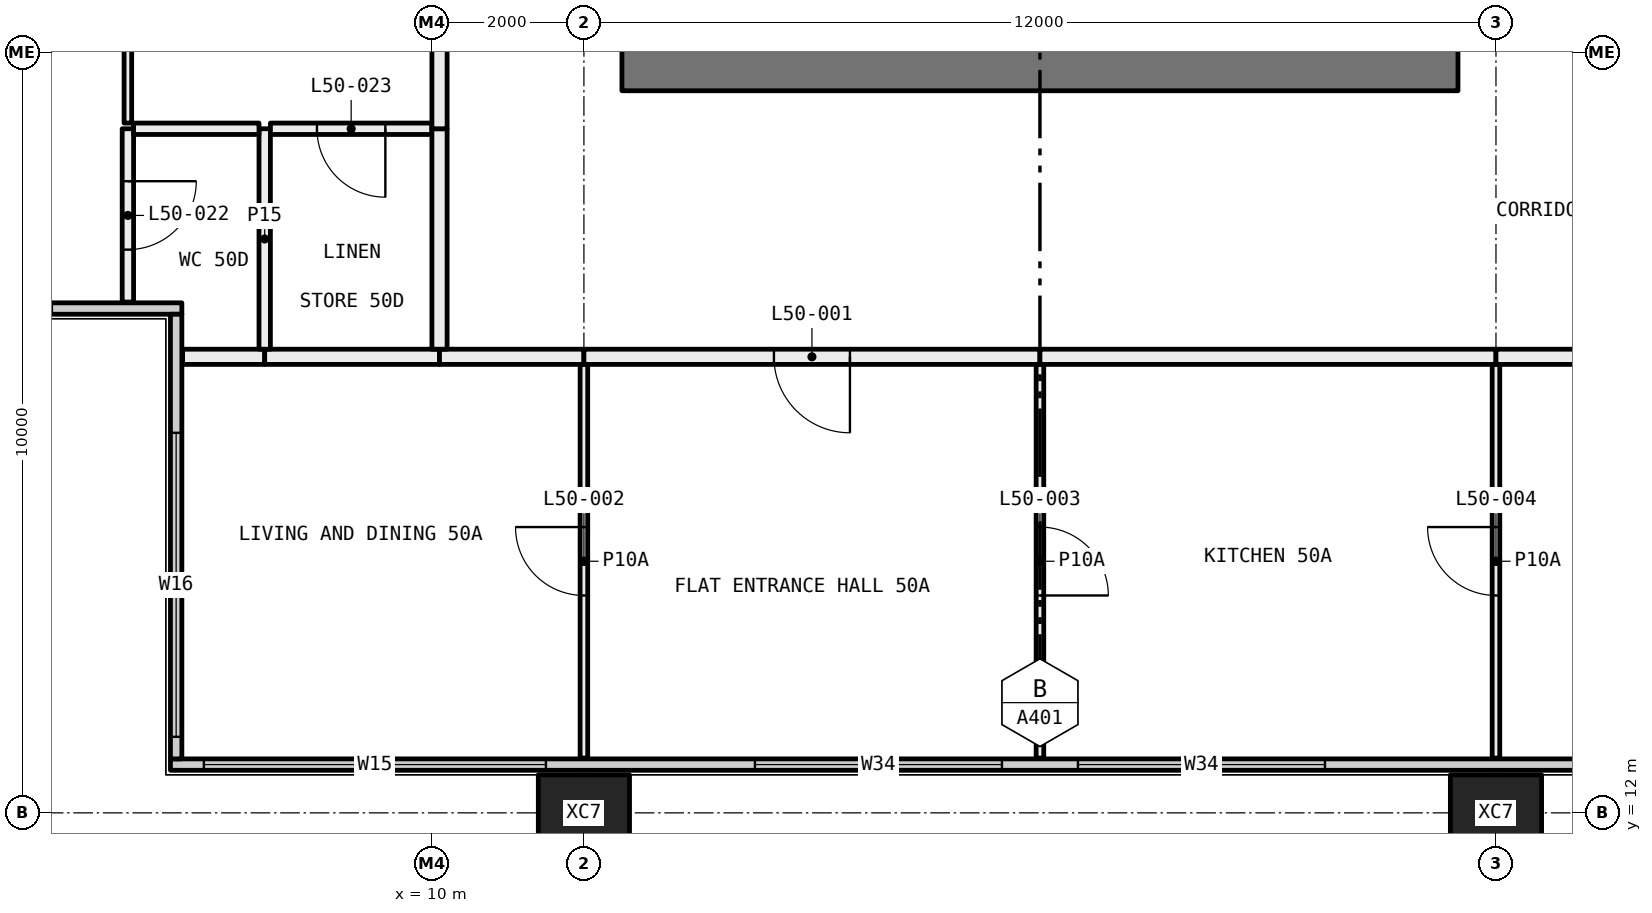
"""IFC4 building model, lengths in metres.
Left out: names, types, materials, properties, quantities, classifications, styles, units other than length and angle.
Written with IfcOpenShell. Run it as: python <this file> out.ifc"""

import sys

from ifc_helpers import new_model, si_unit, direction, frame, frame_2d, origin, origin_2d, place, context, subcontext, project, spatial, rectangle, hollow_rectangle, extrude, element, fill, save


model = new_model("IFC4")
c1 = context("Model", 3, precision=1e-05, world=origin(), true_north=direction((0.0, 1.0)))
c2 = subcontext(c1, "Body", "Model", "MODEL_VIEW")
j1 = project(units=[si_unit("LENGTHUNIT", "METRE"), si_unit("PLANEANGLEUNIT", "RADIAN")], contexts=[c1])
p1 = place(None, origin())
s1 = spatial("IfcSite", under=j1, at=p1, CompositionType="ELEMENT")
p2 = place(p1, origin())
s2 = spatial("IfcBuilding", under=s1, at=p2, CompositionType="ELEMENT")
p3 = place(p2, frame((0.0, 0.0, 189.3)))
s3 = spatial("IfcBuildingStorey", under=s2, at=p3, CompositionType="ELEMENT", Elevation=189.3)
for number, where, z_axis, x_axis in (
    (1, (12.0, 12.0, -0.4), (0.0, 0.0, 1.0), (1.0, 0.0, 0.0)),
    (2, (24.0, 12.0, -0.4), (0.0, 0.0, 1.0), (1.0, 0.0, 0.0)),
):
    element("IfcColumn", number, at=place(p3, frame(where, z_axis=z_axis, x_axis=x_axis)), inside=s3, PredefinedType="COLUMN", context=c2, shape_type="SweptSolid", body=[
        extrude(hollow_rectangle(XDim=1.2, YDim=1.0, WallThickness=0.045, at=origin_2d()), origin(), (0.0, 0.0, 1.0), 3.45),
    ])
p4 = place(p3, frame((6.56, 12.635, 0.0), z_axis=(0.0, 0.0, 1.0), x_axis=(1.0, 0.0, 0.0)))
e3 = element("IfcWall", 3, at=p4, inside=s3, PredefinedType="ELEMENTEDWALL", context=c2, shape_type="SweptSolid", body=[
    extrude(rectangle(XDim=46.88, YDim=0.15, at=frame_2d((23.44, 0.0))), origin(), (0.0, 0.0, 1.0), 3.05),
])
p5 = place(p4, frame((0.44, 0.0, 0.45)))
e4 = element("IfcOpeningElement", 4, at=p5, cuts=e3, PredefinedType="OPENING", context=c2, shape_type="SweptSolid", body=[
    extrude(rectangle(XDim=4.5, YDim=2.55, at=frame_2d((2.25, 1.275))), frame((0.0, 0.085, 0.0), z_axis=(0.0, -1.0, 0.0), x_axis=(1.0, 0.0, 0.0)), (0.0, 0.0, 1.0), 0.17),
])
p6 = place(p4, frame((7.69, 0.0, 0.45)))
e5 = element("IfcOpeningElement", 5, at=p6, cuts=e3, PredefinedType="OPENING", context=c2, shape_type="SweptSolid", body=[
    extrude(rectangle(XDim=3.25, YDim=2.55, at=frame_2d((1.625, 1.275))), frame((0.0, 0.085, 0.0), z_axis=(0.0, -1.0, 0.0), x_axis=(1.0, 0.0, 0.0)), (0.0, 0.0, 1.0), 0.17),
])
p7 = place(p4, frame((11.94, 0.0, 0.45)))
e6 = element("IfcOpeningElement", 6, at=p7, cuts=e3, PredefinedType="OPENING", context=c2, shape_type="SweptSolid", body=[
    extrude(rectangle(XDim=3.25, YDim=2.55, at=frame_2d((1.625, 1.275))), frame((0.0, 0.085, 0.0), z_axis=(0.0, -1.0, 0.0), x_axis=(1.0, 0.0, 0.0)), (0.0, 0.0, 1.0), 0.17),
])
p8 = place(p4, frame((19.69, 0.0, 0.45)))
e7 = element("IfcOpeningElement", 7, at=p8, cuts=e3, PredefinedType="OPENING", context=c2, shape_type="SweptSolid", body=[
    extrude(rectangle(XDim=3.25, YDim=2.55, at=frame_2d((1.625, 1.275))), frame((0.0, 0.085, 0.0), z_axis=(0.0, -1.0, 0.0), x_axis=(1.0, 0.0, 0.0)), (0.0, 0.0, 1.0), 0.17),
])
p9 = place(p4, frame((23.94, 0.0, 0.45)))
e8 = element("IfcOpeningElement", 8, at=p9, cuts=e3, PredefinedType="OPENING", context=c2, shape_type="SweptSolid", body=[
    extrude(rectangle(XDim=2.0, YDim=2.55, at=frame_2d((1.0, 1.275))), frame((0.0, 0.085, 0.0), z_axis=(0.0, -1.0, 0.0), x_axis=(1.0, 0.0, 0.0)), (0.0, 0.0, 1.0), 0.17),
])
p10 = place(p4, frame((31.69, 0.0, 0.45)))
e9 = element("IfcOpeningElement", 9, at=p10, cuts=e3, PredefinedType="OPENING", context=c2, shape_type="SweptSolid", body=[
    extrude(rectangle(XDim=3.25, YDim=2.55, at=frame_2d((1.625, 1.275))), frame((0.0, 0.085, 0.0), z_axis=(0.0, -1.0, 0.0), x_axis=(1.0, 0.0, 0.0)), (0.0, 0.0, 1.0), 0.17),
])
p11 = place(p4, frame((35.94, 0.0, 0.45)))
e10 = element("IfcOpeningElement", 10, at=p11, cuts=e3, PredefinedType="OPENING", context=c2, shape_type="SweptSolid", body=[
    extrude(rectangle(XDim=3.25, YDim=2.55, at=frame_2d((1.625, 1.275))), frame((0.0, 0.085, 0.0), z_axis=(0.0, -1.0, 0.0), x_axis=(1.0, 0.0, 0.0)), (0.0, 0.0, 1.0), 0.17),
])
p12 = place(p4, frame((41.94, 0.0, 0.45)))
e11 = element("IfcOpeningElement", 11, at=p12, cuts=e3, PredefinedType="OPENING", context=c2, shape_type="SweptSolid", body=[
    extrude(rectangle(XDim=4.5, YDim=2.55, at=frame_2d((2.25, 1.275))), frame((0.0, 0.085, 0.0), z_axis=(0.0, -1.0, 0.0), x_axis=(1.0, 0.0, 0.0)), (0.0, 0.0, 1.0), 0.17),
])
p13 = place(p3, frame((0.56, 18.635, 0.0), z_axis=(0.0, 0.0, 1.0), x_axis=(1.0, 0.0, 0.0)))
e12 = element("IfcWall", 12, at=p13, inside=s3, PredefinedType="ELEMENTEDWALL", context=c2, shape_type="SweptSolid", body=[
    extrude(rectangle(XDim=6.15, YDim=0.15, at=frame_2d((3.075, 0.0))), origin(), (0.0, 0.0, 1.0), 3.05),
])
p14 = place(p13, frame((0.44, 0.0, 0.45)))
e13 = element("IfcOpeningElement", 13, at=p14, cuts=e12, PredefinedType="OPENING", context=c2, shape_type="SweptSolid", body=[
    extrude(rectangle(XDim=4.0, YDim=2.55, at=frame_2d((2.0, 1.275))), frame((0.0, 0.085, 0.0), z_axis=(0.0, -1.0, 0.0), x_axis=(1.0, 0.0, 0.0)), (0.0, 0.0, 1.0), 0.17),
])
p15 = place(p3, frame((6.635, 12.71, 0.0), z_axis=(0.0, 0.0, 1.0), x_axis=(0.0, 1.0, 0.0)))
e14 = element("IfcWall", 14, at=p15, inside=s3, PredefinedType="ELEMENTEDWALL", context=c2, shape_type="SweptSolid", body=[
    extrude(rectangle(XDim=5.85, YDim=0.15, at=frame_2d((2.925, 0.0))), origin(), (0.0, 0.0, 1.0), 3.05),
])
p16 = place(p15, frame((0.29, 0.0, 0.45)))
e15 = element("IfcOpeningElement", 15, at=p16, cuts=e14, PredefinedType="OPENING", context=c2, shape_type="SweptSolid", body=[
    extrude(rectangle(XDim=4.0, YDim=2.55, at=frame_2d((2.0, 1.275))), frame((0.0, 0.085, 0.0), z_axis=(0.0, -1.0, 0.0), x_axis=(1.0, 0.0, 0.0)), (0.0, 0.0, 1.0), 0.17),
])
p17 = place(p3, frame((12.0, 12.72, 0.0), z_axis=(0.0, 0.0, 1.0), x_axis=(0.0, 1.0, 0.0)))
e16 = element("IfcWall", 16, at=p17, inside=s3, PredefinedType="PARTITIONING", context=c2, shape_type="SweptSolid", body=[
    extrude(rectangle(XDim=5.18, YDim=0.1, at=frame_2d((2.59, 0.0))), origin(), (0.0, 0.0, 1.0), 3.05),
])
p18 = place(p17, frame((2.14, 0.0, 0.0)))
e17 = element("IfcOpeningElement", 17, at=p18, cuts=e16, PredefinedType="OPENING", context=c2, shape_type="SweptSolid", body=[
    extrude(rectangle(XDim=0.9, YDim=2.1, at=frame_2d((0.45, 1.05))), frame((0.0, 0.06, 0.0), z_axis=(0.0, -1.0, 0.0), x_axis=(1.0, 0.0, 0.0)), (0.0, 0.0, 1.0), 0.12),
])
p19 = place(p3, frame((7.8, 18.0, 0.0), z_axis=(0.0, 0.0, 1.0), x_axis=(-1.0, 0.0, 0.0)))
e18 = element("IfcWall", 18, at=p19, inside=s3, PredefinedType="PARTITIONING", context=c2, shape_type="SweptSolid", body=[
    extrude(rectangle(XDim=1.08, YDim=0.2, at=frame_2d((0.54, 0.0))), origin(), (0.0, 0.0, 1.0), 3.05),
])
p20 = place(p3, frame((10.1, 18.0, 0.0), z_axis=(0.0, 0.0, 1.0), x_axis=(-1.0, 0.0, 0.0)))
e19 = element("IfcWall", 19, at=p20, inside=s3, PredefinedType="PARTITIONING", context=c2, shape_type="SweptSolid", body=[
    extrude(rectangle(XDim=2.3, YDim=0.2, at=frame_2d((1.15, 0.0))), origin(), (0.0, 0.0, 1.0), 3.05),
])
p21 = place(p3, frame((12.0, 18.0, 0.0), z_axis=(0.0, 0.0, 1.0), x_axis=(-1.0, 0.0, 0.0)))
e20 = element("IfcWall", 20, at=p21, inside=s3, PredefinedType="PARTITIONING", context=c2, shape_type="SweptSolid", body=[
    extrude(rectangle(XDim=1.9, YDim=0.2, at=frame_2d((0.95, 0.0))), origin(), (0.0, 0.0, 1.0), 3.05),
])
p22 = place(p3, frame((18.0, 12.72, 0.0), z_axis=(0.0, 0.0, 1.0), x_axis=(0.0, 1.0, 0.0)))
e21 = element("IfcWall", 21, at=p22, inside=s3, PredefinedType="PARTITIONING", context=c2, shape_type="SweptSolid", body=[
    extrude(rectangle(XDim=5.18, YDim=0.1, at=frame_2d((2.59, 0.0))), origin(), (0.0, 0.0, 1.0), 3.05),
])
p23 = place(p22, frame((2.14, 0.0, 0.0)))
e22 = element("IfcOpeningElement", 22, at=p23, cuts=e21, PredefinedType="OPENING", context=c2, shape_type="SweptSolid", body=[
    extrude(rectangle(XDim=0.9, YDim=2.1, at=frame_2d((0.45, 1.05))), frame((0.0, 0.06, 0.0), z_axis=(0.0, -1.0, 0.0), x_axis=(1.0, 0.0, 0.0)), (0.0, 0.0, 1.0), 0.12),
])
p24 = place(p3, frame((18.0, 18.0, 0.0), z_axis=(0.0, 0.0, 1.0), x_axis=(-1.0, 0.0, 0.0)))
e23 = element("IfcWall", 23, at=p24, inside=s3, PredefinedType="PARTITIONING", context=c2, shape_type="SweptSolid", body=[
    extrude(rectangle(XDim=6.0, YDim=0.2, at=frame_2d((3.0, 0.0))), origin(), (0.0, 0.0, 1.0), 3.05),
])
p25 = place(p24, frame((2.5, 0.0, 0.0)))
e24 = element("IfcOpeningElement", 24, at=p25, cuts=e23, PredefinedType="OPENING", context=c2, shape_type="SweptSolid", body=[
    extrude(rectangle(XDim=1.0, YDim=2.1, at=frame_2d((0.5, 1.05))), frame((0.0, 0.11, 0.0), z_axis=(0.0, -1.0, 0.0), x_axis=(1.0, 0.0, 0.0)), (0.0, 0.0, 1.0), 0.22),
])
p26 = place(p3, frame((24.0, 12.72, 0.0), z_axis=(0.0, 0.0, 1.0), x_axis=(0.0, 1.0, 0.0)))
e25 = element("IfcWall", 25, at=p26, inside=s3, PredefinedType="PARTITIONING", context=c2, shape_type="SweptSolid", body=[
    extrude(rectangle(XDim=5.18, YDim=0.1, at=frame_2d((2.59, 0.0))), origin(), (0.0, 0.0, 1.0), 3.05),
])
p27 = place(p26, frame((2.14, 0.0, 0.0)))
e26 = element("IfcOpeningElement", 26, at=p27, cuts=e25, PredefinedType="OPENING", context=c2, shape_type="SweptSolid", body=[
    extrude(rectangle(XDim=0.9, YDim=2.1, at=frame_2d((0.45, 1.05))), frame((0.0, 0.06, 0.0), z_axis=(0.0, -1.0, 0.0), x_axis=(1.0, 0.0, 0.0)), (0.0, 0.0, 1.0), 0.12),
])
for number, where, z_axis, x_axis in (
    (27, (24.0, 18.0, 0.0), (0.0, 0.0, 1.0), (-1.0, 0.0, 0.0)),
    (28, (30.0, 18.0, 0.0), (0.0, 0.0, 1.0), (-1.0, 0.0, 0.0)),
):
    element("IfcWall", number, at=place(p3, frame(where, z_axis=z_axis, x_axis=x_axis)), inside=s3, PredefinedType="PARTITIONING", context=c2, shape_type="SweptSolid", body=[
        extrude(rectangle(XDim=6.0, YDim=0.2, at=frame_2d((3.0, 0.0))), origin(), (0.0, 0.0, 1.0), 3.05),
    ])
p28 = place(p3, frame((6.0, 18.72, 0.0), z_axis=(0.0, 0.0, 1.0), x_axis=(0.0, 1.0, 0.0)))
e29 = element("IfcWall", 29, at=p28, inside=s3, PredefinedType="PARTITIONING", context=c2, shape_type="SweptSolid", body=[
    extrude(rectangle(XDim=2.28, YDim=0.15, at=frame_2d((1.14, 0.0))), origin(), (0.0, 0.0, 1.0), 3.05),
])
p29 = place(p28, frame((0.69, 0.0, 0.0)))
e30 = element("IfcOpeningElement", 30, at=p29, cuts=e29, PredefinedType="OPENING", context=c2, shape_type="SweptSolid", body=[
    extrude(rectangle(XDim=0.9, YDim=2.1, at=frame_2d((0.45, 1.05))), frame((0.0, 0.085, 0.0), z_axis=(0.0, -1.0, 0.0), x_axis=(1.0, 0.0, 0.0)), (0.0, 0.0, 1.0), 0.17),
])
p30 = place(p3, frame((6.0, 21.075, 0.0), z_axis=(0.0, 0.0, 1.0), x_axis=(0.0, 1.0, 0.0)))
e31 = element("IfcWall", 31, at=p30, inside=s3, PredefinedType="PARTITIONING", context=c2, shape_type="SweptSolid", body=[
    extrude(rectangle(XDim=2.875, YDim=0.1, at=frame_2d((1.438, 0.0))), origin(), (0.0, 0.0, 1.0), 2.45),
])
p31 = place(p3, frame((7.8, 18.1, 0.0), z_axis=(0.0, 0.0, 1.0), x_axis=(0.0, 1.0, 0.0)))
e32 = element("IfcWall", 32, at=p31, inside=s3, PredefinedType="PARTITIONING", context=c2, shape_type="SweptSolid", body=[
    extrude(rectangle(XDim=2.9, YDim=0.15, at=frame_2d((1.45, 0.0))), origin(), (0.0, 0.0, 1.0), 3.05),
])
p32 = place(p3, frame((7.725, 21.0, 0.0), z_axis=(0.0, 0.0, 1.0), x_axis=(-1.0, 0.0, 0.0)))
e33 = element("IfcWall", 33, at=p32, inside=s3, PredefinedType="PARTITIONING", context=c2, shape_type="SweptSolid", body=[
    extrude(rectangle(XDim=1.65, YDim=0.15, at=frame_2d((0.825, 0.0))), origin(), (0.0, 0.0, 1.0), 3.05),
])
p33 = place(p3, frame((10.0, 21.0, 0.0), z_axis=(0.0, 0.0, 1.0), x_axis=(-1.0, 0.0, 0.0)))
e34 = element("IfcWall", 34, at=p33, inside=s3, PredefinedType="PARTITIONING", context=c2, shape_type="SweptSolid", body=[
    extrude(rectangle(XDim=2.125, YDim=0.15, at=frame_2d((1.062, 0.0))), origin(), (0.0, 0.0, 1.0), 3.05),
])
p34 = place(p33, frame((0.613, 0.0, 0.0)))
e35 = element("IfcOpeningElement", 35, at=p34, cuts=e34, PredefinedType="OPENING", context=c2, shape_type="SweptSolid", body=[
    extrude(rectangle(XDim=0.9, YDim=2.1, at=frame_2d((0.45, 1.05))), frame((0.0, 0.085, 0.0), z_axis=(0.0, -1.0, 0.0), x_axis=(1.0, 0.0, 0.0)), (0.0, 0.0, 1.0), 0.17),
])
p35 = place(p3, frame((10.1, 18.1, 0.0), z_axis=(0.0, 0.0, 1.0), x_axis=(0.0, 1.0, 0.0)))
e36 = element("IfcWall", 36, at=p35, inside=s3, PredefinedType="PARTITIONING", context=c2, shape_type="SweptSolid", body=[
    extrude(rectangle(XDim=2.9, YDim=0.2, at=frame_2d((1.45, 0.0))), origin(), (0.0, 0.0, 1.0), 3.05),
])
p36 = place(p3, frame((10.1, 21.0, 0.0), z_axis=(0.0, 0.0, 1.0), x_axis=(0.0, 1.0, 0.0)))
e37 = element("IfcWall", 37, at=p36, inside=s3, PredefinedType="PARTITIONING", context=c2, shape_type="SweptSolid", body=[
    extrude(rectangle(XDim=3.1, YDim=0.2, at=frame_2d((1.55, 0.0))), origin(), (0.0, 0.0, 1.0), 2.45),
])
p37 = place(p3, frame((12.5, 21.775, 0.0), z_axis=(0.0, 0.0, 1.0), x_axis=(1.0, 0.0, 0.0)))
e38 = element("IfcWall", 38, at=p37, inside=s3, PredefinedType="SHEAR", context=c2, shape_type="SweptSolid", body=[
    extrude(rectangle(XDim=11.0, YDim=0.55, at=frame_2d((5.5, 0.0))), origin(), (0.0, 0.0, 1.0), 3.05),
])
p38 = place(p5, origin())
e39 = element("IfcWindow", 39, at=p38, inside=s3, PartitioningType="SINGLE_PANEL", PredefinedType="WINDOW", context=c2, shape_type="SweptSolid", body=[
    extrude(rectangle(XDim=4.5, YDim=2.55, at=frame_2d((2.25, 1.275))), frame((0.0, 0.03, 0.0), z_axis=(0.0, -1.0, 0.0), x_axis=(1.0, 0.0, 0.0)), (0.0, 0.0, 1.0), 0.06),
])
fill(e4, e39)
p39 = place(p6, origin())
e40 = element("IfcWindow", 40, at=p39, inside=s3, PartitioningType="SINGLE_PANEL", PredefinedType="WINDOW", context=c2, shape_type="SweptSolid", body=[
    extrude(rectangle(XDim=3.25, YDim=2.55, at=frame_2d((1.625, 1.275))), frame((0.0, 0.03, 0.0), z_axis=(0.0, -1.0, 0.0), x_axis=(1.0, 0.0, 0.0)), (0.0, 0.0, 1.0), 0.06),
])
fill(e5, e40)
p40 = place(p7, origin())
e41 = element("IfcWindow", 41, at=p40, inside=s3, PartitioningType="SINGLE_PANEL", PredefinedType="WINDOW", context=c2, shape_type="SweptSolid", body=[
    extrude(rectangle(XDim=3.25, YDim=2.55, at=frame_2d((1.625, 1.275))), frame((0.0, 0.03, 0.0), z_axis=(0.0, -1.0, 0.0), x_axis=(1.0, 0.0, 0.0)), (0.0, 0.0, 1.0), 0.06),
])
fill(e6, e41)
p41 = place(p16, origin())
e42 = element("IfcWindow", 42, at=p41, inside=s3, PartitioningType="SINGLE_PANEL", PredefinedType="WINDOW", context=c2, shape_type="SweptSolid", body=[
    extrude(rectangle(XDim=4.0, YDim=2.55, at=frame_2d((2.0, 1.275))), frame((0.0, 0.03, 0.0), z_axis=(0.0, -1.0, 0.0), x_axis=(1.0, 0.0, 0.0)), (0.0, 0.0, 1.0), 0.06),
])
fill(e15, e42)
p42 = place(p25, origin())
e43 = element("IfcDoor", 43, at=p42, inside=s3, OperationType="SINGLE_SWING_RIGHT", PredefinedType="DOOR", context=c2, shape_type="SweptSolid", body=[
    extrude(rectangle(XDim=1.0, YDim=2.1, at=frame_2d((0.5, 1.05))), frame((0.0, 0.025, 0.0), z_axis=(0.0, -1.0, 0.0), x_axis=(1.0, 0.0, 0.0)), (0.0, 0.0, 1.0), 0.05),
])
fill(e24, e43)
p43 = place(p18, origin())
e44 = element("IfcDoor", 44, at=p43, inside=s3, OperationType="SINGLE_SWING_LEFT", PredefinedType="DOOR", context=c2, shape_type="SweptSolid", body=[
    extrude(rectangle(XDim=0.9, YDim=2.1, at=frame_2d((0.45, 1.05))), frame((0.0, 0.025, 0.0), z_axis=(0.0, -1.0, 0.0), x_axis=(1.0, 0.0, 0.0)), (0.0, 0.0, 1.0), 0.05),
])
fill(e17, e44)
p44 = place(p23, frame((0.9, 0.0, 0.0), x_axis=(-1.0, 0.0, 0.0)))
e45 = element("IfcDoor", 45, at=p44, inside=s3, OperationType="SINGLE_SWING_LEFT", PredefinedType="DOOR", context=c2, shape_type="SweptSolid", body=[
    extrude(rectangle(XDim=0.9, YDim=2.1, at=frame_2d((0.45, 1.05))), frame((0.0, 0.025, 0.0), z_axis=(0.0, -1.0, 0.0), x_axis=(1.0, 0.0, 0.0)), (0.0, 0.0, 1.0), 0.05),
])
fill(e22, e45)
p45 = place(p27, origin())
e46 = element("IfcDoor", 46, at=p45, inside=s3, OperationType="SINGLE_SWING_LEFT", PredefinedType="DOOR", context=c2, shape_type="SweptSolid", body=[
    extrude(rectangle(XDim=0.9, YDim=2.1, at=frame_2d((0.45, 1.05))), frame((0.0, 0.025, 0.0), z_axis=(0.0, -1.0, 0.0), x_axis=(1.0, 0.0, 0.0)), (0.0, 0.0, 1.0), 0.05),
])
fill(e26, e46)
p46 = place(p29, frame((0.9, 0.0, 0.0), x_axis=(-1.0, 0.0, 0.0)))
e47 = element("IfcDoor", 47, at=p46, inside=s3, OperationType="SINGLE_SWING_RIGHT", PredefinedType="DOOR", context=c2, shape_type="SweptSolid", body=[
    extrude(rectangle(XDim=0.9, YDim=2.1, at=frame_2d((0.45, 1.05))), frame((0.0, 0.025, 0.0), z_axis=(0.0, -1.0, 0.0), x_axis=(1.0, 0.0, 0.0)), (0.0, 0.0, 1.0), 0.05),
])
fill(e30, e47)
p47 = place(p34, origin())
e48 = element("IfcDoor", 48, at=p47, inside=s3, OperationType="SINGLE_SWING_RIGHT", PredefinedType="DOOR", context=c2, shape_type="SweptSolid", body=[
    extrude(rectangle(XDim=0.9, YDim=2.1, at=frame_2d((0.45, 1.05))), frame((0.0, 0.025, 0.0), z_axis=(0.0, -1.0, 0.0), x_axis=(1.0, 0.0, 0.0)), (0.0, 0.0, 1.0), 0.05),
])
fill(e35, e48)
save(model, sys.argv[1])
